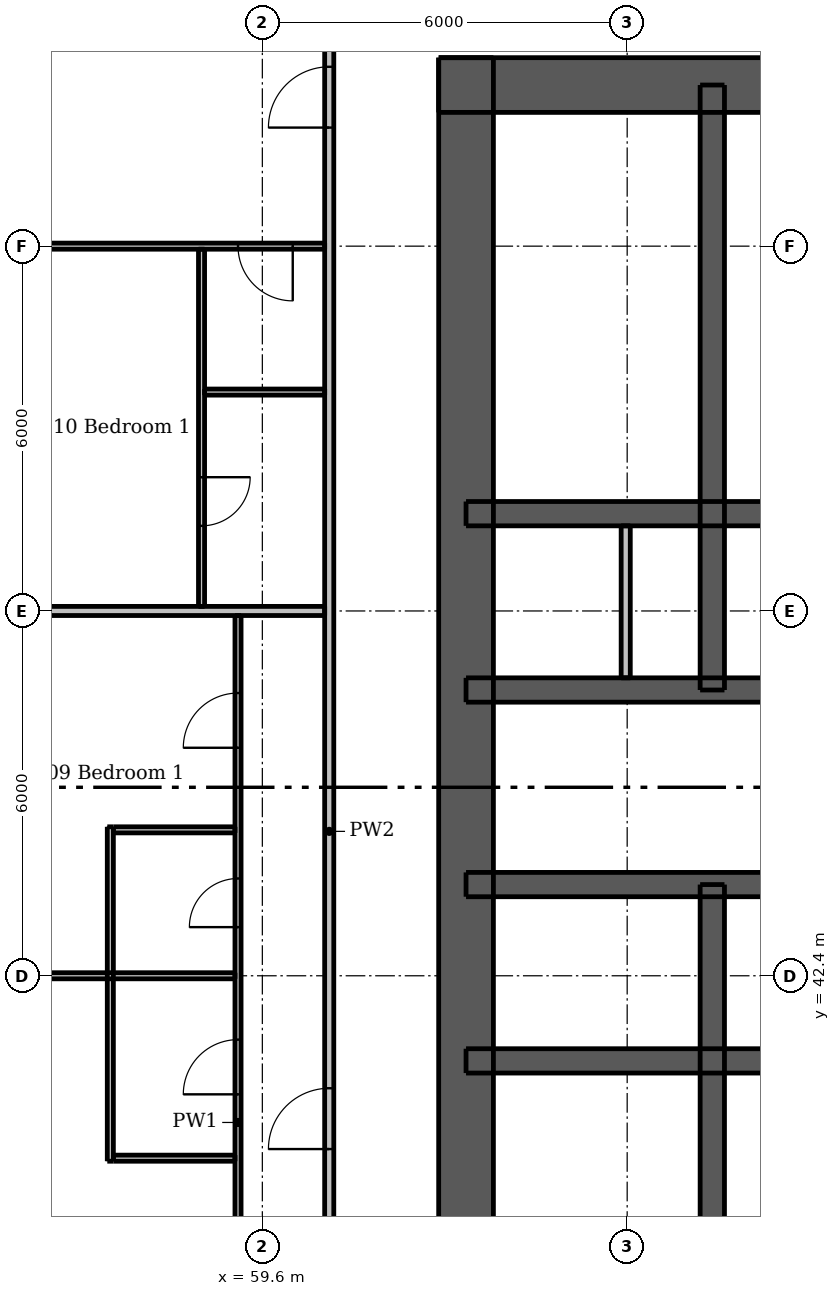
"""IFC4 building model, lengths in metres.
Left out: names, types, materials, properties, quantities, classifications, styles, units other than length and angle.
Written with IfcOpenShell. Run it as: python <this file> out.ifc"""

import sys

from ifc_helpers import new_model, si_unit, direction, frame, frame_2d, origin, place, context, subcontext, project, spatial, rectangle, extrude, element, fill, save


model = new_model("IFC4")
c1 = context("Model", 3, precision=1e-05, world=origin(), true_north=direction((0.0, 1.0)))
c2 = subcontext(c1, "Body", "Model", "MODEL_VIEW")
j1 = project(units=[si_unit("LENGTHUNIT", "METRE"), si_unit("PLANEANGLEUNIT", "RADIAN")], contexts=[c1])
p1 = place(None, origin())
s1 = spatial("IfcSite", under=j1, at=p1, CompositionType="ELEMENT")
p2 = place(p1, origin())
s2 = spatial("IfcBuilding", under=s1, at=p2, CompositionType="ELEMENT")
p3 = place(p2, frame((0.0, 0.0, 53.2)))
s3 = spatial("IfcBuildingStorey", under=s2, at=p3, CompositionType="ELEMENT", Elevation=53.2)
p4 = place(p3, frame((62.5, 57.05, 0.0), z_axis=(0.0, 0.0, 1.0), x_axis=(1.0, 0.0, 0.0)))
e1 = element("IfcWall", 1, at=p4, inside=s3, PredefinedType="SHEAR", context=c2, shape_type="SweptSolid", body=[
    extrude(rectangle(XDim=24.0, YDim=0.9, at=frame_2d((12.0, 0.0))), origin(), (0.0, 0.0, 1.0), 3.05),
])
p5 = place(p4, frame((20.85, 0.0, 0.0)))
e2 = element("IfcOpeningElement", 2, at=p5, cuts=e1, PredefinedType="OPENING", context=c2, shape_type="SweptSolid", body=[
    extrude(rectangle(XDim=1.1, YDim=2.1, at=frame_2d((0.55, 1.05))), frame((0.0, 0.46, 0.0), z_axis=(0.0, -1.0, 0.0), x_axis=(1.0, 0.0, 0.0)), (0.0, 0.0, 1.0), 0.92),
])
p6 = place(p4, frame((2.05, 0.0, 0.0)))
e3 = element("IfcOpeningElement", 3, at=p6, cuts=e1, PredefinedType="OPENING", context=c2, shape_type="SweptSolid", body=[
    extrude(rectangle(XDim=1.1, YDim=2.1, at=frame_2d((0.55, 1.05))), frame((0.0, 0.46, 0.0), z_axis=(0.0, -1.0, 0.0), x_axis=(1.0, 0.0, 0.0)), (0.0, 0.0, 1.0), 0.92),
])
p7 = place(p4, frame((11.55, 0.0, 0.0)))
e4 = element("IfcOpeningElement", 4, at=p7, cuts=e1, PredefinedType="OPENING", context=c2, shape_type="SweptSolid", body=[
    extrude(rectangle(XDim=0.9, YDim=2.1, at=frame_2d((0.45, 1.05))), frame((0.0, 0.46, 0.0), z_axis=(0.0, -1.0, 0.0), x_axis=(1.0, 0.0, 0.0)), (0.0, 0.0, 1.0), 0.92),
])
p8 = place(p3, frame((62.95, 33.5, 0.0), z_axis=(0.0, 0.0, 1.0), x_axis=(0.0, 1.0, 0.0)))
e5 = element("IfcWall", 5, at=p8, inside=s3, PredefinedType="SHEAR", context=c2, shape_type="SweptSolid", body=[
    extrude(rectangle(XDim=24.0, YDim=0.9, at=frame_2d((12.0, 0.0))), origin(), (0.0, 0.0, 1.0), 3.05),
])
p9 = place(p8, frame((11.2, 0.0, 0.0)))
e6 = element("IfcOpeningElement", 6, at=p9, cuts=e5, PredefinedType="OPENING", context=c2, shape_type="SweptSolid", body=[
    extrude(rectangle(XDim=1.6, YDim=2.1, at=frame_2d((0.8, 1.05))), frame((0.0, 0.46, 0.0), z_axis=(0.0, -1.0, 0.0), x_axis=(1.0, 0.0, 0.0)), (0.0, 0.0, 1.0), 0.92),
])
p10 = place(p3, frame((62.95, 41.0, 0.0), z_axis=(0.0, 0.0, 1.0), x_axis=(1.0, 0.0, 0.0)))
e7 = element("IfcWall", 7, at=p10, inside=s3, PredefinedType="SHEAR", context=c2, shape_type="SweptSolid", body=[
    extrude(rectangle(XDim=23.1, YDim=0.4, at=frame_2d((11.55, 0.0))), origin(), (0.0, 0.0, 1.0), 3.05),
])
p11 = place(p3, frame((62.95, 43.9, 0.0), z_axis=(0.0, 0.0, 1.0), x_axis=(1.0, 0.0, 0.0)))
e8 = element("IfcWall", 8, at=p11, inside=s3, PredefinedType="SHEAR", context=c2, shape_type="SweptSolid", body=[
    extrude(rectangle(XDim=23.1, YDim=0.4, at=frame_2d((11.55, 0.0))), origin(), (0.0, 0.0, 1.0), 3.05),
])
p12 = place(p11, frame((1.7, 0.0, 0.0)))
e9 = element("IfcOpeningElement", 9, at=p12, cuts=e8, PredefinedType="OPENING", context=c2, shape_type="SweptSolid", body=[
    extrude(rectangle(XDim=0.9, YDim=2.1, at=frame_2d((0.45, 1.05))), frame((0.0, 0.21, 0.0), z_axis=(0.0, -1.0, 0.0), x_axis=(1.0, 0.0, 0.0)), (0.0, 0.0, 1.0), 0.42),
])
p13 = place(p11, frame((20.5, 0.0, 0.0)))
e10 = element("IfcOpeningElement", 10, at=p13, cuts=e8, PredefinedType="OPENING", context=c2, shape_type="SweptSolid", body=[
    extrude(rectangle(XDim=0.9, YDim=2.1, at=frame_2d((0.45, 1.05))), frame((0.0, 0.21, 0.0), z_axis=(0.0, -1.0, 0.0), x_axis=(1.0, 0.0, 0.0)), (0.0, 0.0, 1.0), 0.42),
])
p14 = place(p11, frame((4.75, 0.0, 0.0)))
e11 = element("IfcOpeningElement", 11, at=p14, cuts=e8, PredefinedType="OPENING", context=c2, shape_type="SweptSolid", body=[
    extrude(rectangle(XDim=1.1, YDim=2.1, at=frame_2d((0.55, 1.05))), frame((0.0, 0.21, 0.0), z_axis=(0.0, -1.0, 0.0), x_axis=(1.0, 0.0, 0.0)), (0.0, 0.0, 1.0), 0.42),
])
p15 = place(p11, frame((7.25, 0.0, 0.0)))
e12 = element("IfcOpeningElement", 12, at=p15, cuts=e8, PredefinedType="OPENING", context=c2, shape_type="SweptSolid", body=[
    extrude(rectangle(XDim=1.1, YDim=2.1, at=frame_2d((0.55, 1.05))), frame((0.0, 0.21, 0.0), z_axis=(0.0, -1.0, 0.0), x_axis=(1.0, 0.0, 0.0)), (0.0, 0.0, 1.0), 0.42),
])
p16 = place(p11, frame((9.75, 0.0, 0.0)))
e13 = element("IfcOpeningElement", 13, at=p16, cuts=e8, PredefinedType="OPENING", context=c2, shape_type="SweptSolid", body=[
    extrude(rectangle(XDim=1.1, YDim=2.1, at=frame_2d((0.55, 1.05))), frame((0.0, 0.21, 0.0), z_axis=(0.0, -1.0, 0.0), x_axis=(1.0, 0.0, 0.0)), (0.0, 0.0, 1.0), 0.42),
])
p17 = place(p11, frame((12.25, 0.0, 0.0)))
e14 = element("IfcOpeningElement", 14, at=p17, cuts=e8, PredefinedType="OPENING", context=c2, shape_type="SweptSolid", body=[
    extrude(rectangle(XDim=1.1, YDim=2.1, at=frame_2d((0.55, 1.05))), frame((0.0, 0.21, 0.0), z_axis=(0.0, -1.0, 0.0), x_axis=(1.0, 0.0, 0.0)), (0.0, 0.0, 1.0), 0.42),
])
p18 = place(p11, frame((14.75, 0.0, 0.0)))
e15 = element("IfcOpeningElement", 15, at=p18, cuts=e8, PredefinedType="OPENING", context=c2, shape_type="SweptSolid", body=[
    extrude(rectangle(XDim=1.1, YDim=2.1, at=frame_2d((0.55, 1.05))), frame((0.0, 0.21, 0.0), z_axis=(0.0, -1.0, 0.0), x_axis=(1.0, 0.0, 0.0)), (0.0, 0.0, 1.0), 0.42),
])
p19 = place(p11, frame((17.25, 0.0, 0.0)))
e16 = element("IfcOpeningElement", 16, at=p19, cuts=e8, PredefinedType="OPENING", context=c2, shape_type="SweptSolid", body=[
    extrude(rectangle(XDim=1.1, YDim=2.1, at=frame_2d((0.55, 1.05))), frame((0.0, 0.21, 0.0), z_axis=(0.0, -1.0, 0.0), x_axis=(1.0, 0.0, 0.0)), (0.0, 0.0, 1.0), 0.42),
])
p20 = place(p3, frame((62.95, 47.1, 0.0), z_axis=(0.0, 0.0, 1.0), x_axis=(1.0, 0.0, 0.0)))
e17 = element("IfcWall", 17, at=p20, inside=s3, PredefinedType="SHEAR", context=c2, shape_type="SweptSolid", body=[
    extrude(rectangle(XDim=23.1, YDim=0.4, at=frame_2d((11.55, 0.0))), origin(), (0.0, 0.0, 1.0), 3.05),
])
p21 = place(p20, frame((1.088, 0.0, 0.0)))
e18 = element("IfcOpeningElement", 18, at=p21, cuts=e17, PredefinedType="OPENING", context=c2, shape_type="SweptSolid", body=[
    extrude(rectangle(XDim=0.9, YDim=2.1, at=frame_2d((0.45, 1.05))), frame((0.0, 0.21, 0.0), z_axis=(0.0, -1.0, 0.0), x_axis=(1.0, 0.0, 0.0)), (0.0, 0.0, 1.0), 0.42),
])
p22 = place(p20, frame((2.838, 0.0, 0.0)))
e19 = element("IfcOpeningElement", 19, at=p22, cuts=e17, PredefinedType="OPENING", context=c2, shape_type="SweptSolid", body=[
    extrude(rectangle(XDim=0.8, YDim=2.1, at=frame_2d((0.4, 1.05))), frame((0.0, 0.21, 0.0), z_axis=(0.0, -1.0, 0.0), x_axis=(1.0, 0.0, 0.0)), (0.0, 0.0, 1.0), 0.42),
])
p23 = place(p20, frame((20.5, 0.0, 0.0)))
e20 = element("IfcOpeningElement", 20, at=p23, cuts=e17, PredefinedType="OPENING", context=c2, shape_type="SweptSolid", body=[
    extrude(rectangle(XDim=0.9, YDim=2.1, at=frame_2d((0.45, 1.05))), frame((0.0, 0.21, 0.0), z_axis=(0.0, -1.0, 0.0), x_axis=(1.0, 0.0, 0.0)), (0.0, 0.0, 1.0), 0.42),
])
p24 = place(p3, frame((62.95, 50.0, 0.0), z_axis=(0.0, 0.0, 1.0), x_axis=(1.0, 0.0, 0.0)))
e21 = element("IfcWall", 21, at=p24, inside=s3, PredefinedType="SHEAR", context=c2, shape_type="SweptSolid", body=[
    extrude(rectangle(XDim=23.1, YDim=0.4, at=frame_2d((11.55, 0.0))), origin(), (0.0, 0.0, 1.0), 3.05),
])
p25 = place(p3, frame((67.0, 33.95, 0.0), z_axis=(0.0, 0.0, 1.0), x_axis=(0.0, 1.0, 0.0)))
e22 = element("IfcWall", 22, at=p25, inside=s3, PredefinedType="SHEAR", context=c2, shape_type="SweptSolid", body=[
    extrude(rectangle(XDim=9.95, YDim=0.4, at=frame_2d((4.975, 0.0))), origin(), (0.0, 0.0, 1.0), 3.05),
])
p26 = place(p25, frame((0.65, 0.0, 0.0)))
e23 = element("IfcOpeningElement", 23, at=p26, cuts=e22, PredefinedType="OPENING", context=c2, shape_type="SweptSolid", body=[
    extrude(rectangle(XDim=1.1, YDim=2.1, at=frame_2d((0.55, 1.05))), frame((0.0, 0.21, 0.0), z_axis=(0.0, -1.0, 0.0), x_axis=(1.0, 0.0, 0.0)), (0.0, 0.0, 1.0), 0.42),
])
p27 = place(p3, frame((67.0, 47.1, 0.0), z_axis=(0.0, 0.0, 1.0), x_axis=(0.0, 1.0, 0.0)))
e24 = element("IfcWall", 24, at=p27, inside=s3, PredefinedType="SHEAR", context=c2, shape_type="SweptSolid", body=[
    extrude(rectangle(XDim=9.95, YDim=0.4, at=frame_2d((4.975, 0.0))), origin(), (0.0, 0.0, 1.0), 3.05),
])
p28 = place(p3, frame((65.576, 47.3, 0.0), z_axis=(0.0, 0.0, 1.0), x_axis=(0.0, 1.0, 0.0)))
e25 = element("IfcWall", 25, at=p28, inside=s3, PredefinedType="PLUMBINGWALL", context=c2, shape_type="SweptSolid", body=[
    extrude(rectangle(XDim=2.5, YDim=0.15, at=frame_2d((1.25, 0.0))), origin(), (0.0, 0.0, 1.0), 3.05),
])
p29 = place(p3, frame((57.1, 39.35, 0.0), z_axis=(0.0, 0.0, 1.0), x_axis=(0.0, 1.0, 0.0)))
e26 = element("IfcWall", 26, at=p29, inside=s3, PredefinedType="PARTITIONING", context=c2, shape_type="SweptSolid", body=[
    extrude(rectangle(XDim=5.5, YDim=0.1, at=frame_2d((2.75, 0.0))), origin(), (0.0, 0.0, 1.0), 3.05),
])
p30 = place(p3, frame((58.6, 54.35, 0.0), z_axis=(0.0, 0.0, 1.0), x_axis=(0.0, -1.0, 0.0)))
e27 = element("IfcWall", 27, at=p30, inside=s3, PredefinedType="PARTITIONING", context=c2, shape_type="SweptSolid", body=[
    extrude(rectangle(XDim=5.875, YDim=0.1, at=frame_2d((2.938, 0.0))), origin(), (0.0, 0.0, 1.0), 3.05),
])
p31 = place(p30, frame((3.75, 0.0, 0.0)))
e28 = element("IfcOpeningElement", 28, at=p31, cuts=e27, PredefinedType="OPENING", context=c2, shape_type="SweptSolid", body=[
    extrude(rectangle(XDim=0.8, YDim=2.1, at=frame_2d((0.4, 1.05))), frame((0.0, 0.06, 0.0), z_axis=(0.0, -1.0, 0.0), x_axis=(1.0, 0.0, 0.0)), (0.0, 0.0, 1.0), 0.12),
])
p32 = place(p3, frame((59.2, 31.65, 0.0), z_axis=(0.0, 0.0, 1.0), x_axis=(0.0, 1.0, 0.0)))
e29 = element("IfcWall", 29, at=p32, inside=s3, PredefinedType="PARTITIONING", context=c2, shape_type="SweptSolid", body=[
    extrude(rectangle(XDim=16.675, YDim=0.1, at=frame_2d((8.337, 0.0))), origin(), (0.0, 0.0, 1.0), 3.05),
])
p33 = place(p32, frame((3.45, 0.0, 0.0)))
e30 = element("IfcOpeningElement", 30, at=p33, cuts=e29, PredefinedType="OPENING", context=c2, shape_type="SweptSolid", body=[
    extrude(rectangle(XDim=0.9, YDim=2.1, at=frame_2d((0.45, 1.05))), frame((0.0, 0.06, 0.0), z_axis=(0.0, -1.0, 0.0), x_axis=(1.0, 0.0, 0.0)), (0.0, 0.0, 1.0), 0.12),
])
p34 = place(p32, frame((8.8, 0.0, 0.0)))
e31 = element("IfcOpeningElement", 31, at=p34, cuts=e29, PredefinedType="OPENING", context=c2, shape_type="SweptSolid", body=[
    extrude(rectangle(XDim=0.9, YDim=2.1, at=frame_2d((0.45, 1.05))), frame((0.0, 0.06, 0.0), z_axis=(0.0, -1.0, 0.0), x_axis=(1.0, 0.0, 0.0)), (0.0, 0.0, 1.0), 0.12),
])
p35 = place(p32, frame((14.5, 0.0, 0.0)))
e32 = element("IfcOpeningElement", 32, at=p35, cuts=e29, PredefinedType="OPENING", context=c2, shape_type="SweptSolid", body=[
    extrude(rectangle(XDim=0.9, YDim=2.1, at=frame_2d((0.45, 1.05))), frame((0.0, 0.06, 0.0), z_axis=(0.0, -1.0, 0.0), x_axis=(1.0, 0.0, 0.0)), (0.0, 0.0, 1.0), 0.12),
])
p36 = place(p32, frame((11.55, 0.0, 0.0)))
e33 = element("IfcOpeningElement", 33, at=p36, cuts=e29, PredefinedType="OPENING", context=c2, shape_type="SweptSolid", body=[
    extrude(rectangle(XDim=0.8, YDim=2.1, at=frame_2d((0.4, 1.05))), frame((0.0, 0.06, 0.0), z_axis=(0.0, -1.0, 0.0), x_axis=(1.0, 0.0, 0.0)), (0.0, 0.0, 1.0), 0.12),
])
p37 = place(p3, frame((60.625, 54.4, 0.0), z_axis=(0.0, 0.0, 1.0), x_axis=(-1.0, 0.0, 0.0)))
e34 = element("IfcWall", 34, at=p37, inside=s3, PredefinedType="PARTITIONING", context=c2, shape_type="SweptSolid", body=[
    extrude(rectangle(XDim=8.625, YDim=0.1, at=frame_2d((4.312, 0.0))), origin(), (0.0, 0.0, 1.0), 2.516),
])
p38 = place(p37, frame((0.525, 0.0, 0.0)))
e35 = element("IfcOpeningElement", 35, at=p38, cuts=e34, PredefinedType="OPENING", context=c2, shape_type="SweptSolid", body=[
    extrude(rectangle(XDim=0.9, YDim=2.1, at=frame_2d((0.45, 1.05))), frame((0.0, 0.06, 0.0), z_axis=(0.0, -1.0, 0.0), x_axis=(1.0, 0.0, 0.0)), (0.0, 0.0, 1.0), 0.12),
])
p39 = place(p37, frame((4.875, 0.0, 0.0)))
e36 = element("IfcOpeningElement", 36, at=p39, cuts=e34, PredefinedType="OPENING", context=c2, shape_type="SweptSolid", body=[
    extrude(rectangle(XDim=0.9, YDim=2.1, at=frame_2d((0.45, 1.05))), frame((0.0, 0.06, 0.0), z_axis=(0.0, -1.0, 0.0), x_axis=(1.0, 0.0, 0.0)), (0.0, 0.0, 1.0), 0.12),
])
p40 = place(p3, frame((58.65, 52.0, 0.0), z_axis=(0.0, 0.0, 1.0), x_axis=(1.0, 0.0, 0.0)))
e37 = element("IfcWall", 37, at=p40, inside=s3, PredefinedType="PARTITIONING", context=c2, shape_type="SweptSolid", body=[
    extrude(rectangle(XDim=1.975, YDim=0.1, at=frame_2d((0.988, 0.0))), origin(), (0.0, 0.0, 1.0), 3.05),
])
p41 = place(p3, frame((57.15, 44.8, 0.0), z_axis=(0.0, 0.0, 1.0), x_axis=(1.0, 0.0, 0.0)))
e38 = element("IfcWall", 38, at=p41, inside=s3, PredefinedType="PARTITIONING", context=c2, shape_type="SweptSolid", body=[
    extrude(rectangle(XDim=2.0, YDim=0.1, at=frame_2d((1.0, 0.0))), origin(), (0.0, 0.0, 1.0), 3.05),
])
p42 = place(p3, frame((52.0, 42.4, 0.0), z_axis=(0.0, 0.0, 1.0), x_axis=(1.0, 0.0, 0.0)))
e39 = element("IfcWall", 39, at=p42, inside=s3, PredefinedType="PARTITIONING", context=c2, shape_type="SweptSolid", body=[
    extrude(rectangle(XDim=7.15, YDim=0.1, at=frame_2d((3.575, 0.0))), origin(), (0.0, 0.0, 1.0), 2.516),
])
p43 = place(p3, frame((57.15, 39.4, 0.0), z_axis=(0.0, 0.0, 1.0), x_axis=(1.0, 0.0, 0.0)))
e40 = element("IfcWall", 40, at=p43, inside=s3, PredefinedType="PARTITIONING", context=c2, shape_type="SweptSolid", body=[
    extrude(rectangle(XDim=2.0, YDim=0.1, at=frame_2d((1.0, 0.0))), origin(), (0.0, 0.0, 1.0), 3.05),
])
p44 = place(p3, frame((60.7, 30.325, 0.0), z_axis=(0.0, 0.0, 1.0), x_axis=(0.0, 1.0, 0.0)))
e41 = element("IfcWall", 41, at=p44, inside=s3, PredefinedType="PARTITIONING", context=c2, shape_type="SweptSolid", body=[
    extrude(rectangle(XDim=28.9, YDim=0.15, at=frame_2d((14.45, 0.0))), origin(), (0.0, 0.0, 1.0), 3.05),
])
p45 = place(p44, frame((9.225, 0.0, 0.0)))
e42 = element("IfcOpeningElement", 42, at=p45, cuts=e41, PredefinedType="OPENING", context=c2, shape_type="SweptSolid", body=[
    extrude(rectangle(XDim=1.0, YDim=2.1, at=frame_2d((0.5, 1.05))), frame((0.0, 0.085, 0.0), z_axis=(0.0, -1.0, 0.0), x_axis=(1.0, 0.0, 0.0)), (0.0, 0.0, 1.0), 0.17),
])
p46 = place(p44, frame((26.025, 0.0, 0.0)))
e43 = element("IfcOpeningElement", 43, at=p46, cuts=e41, PredefinedType="OPENING", context=c2, shape_type="SweptSolid", body=[
    extrude(rectangle(XDim=1.0, YDim=2.1, at=frame_2d((0.5, 1.05))), frame((0.0, 0.085, 0.0), z_axis=(0.0, -1.0, 0.0), x_axis=(1.0, 0.0, 0.0)), (0.0, 0.0, 1.0), 0.17),
])
p47 = place(p3, frame((52.0, 48.4, 0.0), z_axis=(0.0, 0.0, 1.0), x_axis=(1.0, 0.0, 0.0)))
e44 = element("IfcWall", 44, at=p47, inside=s3, PredefinedType="PARTITIONING", context=c2, shape_type="SweptSolid", body=[
    extrude(rectangle(XDim=8.625, YDim=0.15, at=frame_2d((4.312, 0.0))), origin(), (0.0, 0.0, 1.0), 2.516),
])
p48 = place(p6, origin())
e45 = element("IfcDoor", 45, at=p48, inside=s3, OperationType="SINGLE_SWING_LEFT", PredefinedType="DOOR", context=c2, shape_type="SweptSolid", body=[
    extrude(rectangle(XDim=1.1, YDim=2.1, at=frame_2d((0.55, 1.05))), frame((0.0, -0.388, 0.0), z_axis=(0.0, -1.0, 0.0), x_axis=(1.0, 0.0, 0.0)), (0.0, 0.0, 1.0), 0.05),
])
fill(e3, e45)
p49 = place(p9, origin())
e46 = element("IfcDoor", 46, at=p49, inside=s3, OperationType="DOUBLE_DOOR_SINGLE_SWING", PredefinedType="DOOR", context=c2, shape_type="SweptSolid", body=[
    extrude(rectangle(XDim=1.6, YDim=2.1, at=frame_2d((0.8, 1.05))), frame((0.0, -0.388, 0.0), z_axis=(0.0, -1.0, 0.0), x_axis=(1.0, 0.0, 0.0)), (0.0, 0.0, 1.0), 0.05),
])
fill(e6, e46)
p50 = place(p12, origin())
e47 = element("IfcDoor", 47, at=p50, inside=s3, OperationType="SINGLE_SWING_LEFT", PredefinedType="DOOR", context=c2, shape_type="SweptSolid", body=[
    extrude(rectangle(XDim=0.9, YDim=2.1, at=frame_2d((0.45, 1.05))), frame((0.0, -0.138, 0.0), z_axis=(0.0, -1.0, 0.0), x_axis=(1.0, 0.0, 0.0)), (0.0, 0.0, 1.0), 0.05),
])
fill(e9, e47)
p51 = place(p21, origin())
e48 = element("IfcDoor", 48, at=p51, inside=s3, OperationType="SINGLE_SWING_LEFT", PredefinedType="DOOR", context=c2, shape_type="SweptSolid", body=[
    extrude(rectangle(XDim=0.9, YDim=2.1, at=frame_2d((0.45, 1.05))), frame((0.0, 0.188, 0.0), z_axis=(0.0, -1.0, 0.0), x_axis=(1.0, 0.0, 0.0)), (0.0, 0.0, 1.0), 0.05),
])
fill(e18, e48)
p52 = place(p22, origin())
e49 = element("IfcDoor", 49, at=p52, inside=s3, OperationType="SINGLE_SWING_RIGHT", PredefinedType="DOOR", context=c2, shape_type="SweptSolid", body=[
    extrude(rectangle(XDim=0.8, YDim=2.1, at=frame_2d((0.4, 1.05))), frame((0.0, 0.188, 0.0), z_axis=(0.0, -1.0, 0.0), x_axis=(1.0, 0.0, 0.0)), (0.0, 0.0, 1.0), 0.05),
])
fill(e19, e49)
p53 = place(p14, origin())
e50 = element("IfcDoor", 50, at=p53, inside=s3, OperationType="DOUBLE_DOOR_SLIDING", PredefinedType="DOOR", context=c2, shape_type="SweptSolid", body=[
    extrude(rectangle(XDim=1.1, YDim=2.1, at=frame_2d((0.55, 1.05))), frame((0.0, 0.025, 0.0), z_axis=(0.0, -1.0, 0.0), x_axis=(1.0, 0.0, 0.0)), (0.0, 0.0, 1.0), 0.05),
])
fill(e11, e50)
p54 = place(p45, origin())
e51 = element("IfcDoor", 51, at=p54, inside=s3, OperationType="SINGLE_SWING_LEFT", PredefinedType="DOOR", context=c2, shape_type="SweptSolid", body=[
    extrude(rectangle(XDim=1.0, YDim=2.1, at=frame_2d((0.5, 1.05))), frame((0.0, 0.025, 0.0), z_axis=(0.0, -1.0, 0.0), x_axis=(1.0, 0.0, 0.0)), (0.0, 0.0, 1.0), 0.05),
])
fill(e42, e51)
p55 = place(p34, origin())
e52 = element("IfcDoor", 52, at=p55, inside=s3, OperationType="SINGLE_SWING_LEFT", PredefinedType="DOOR", context=c2, shape_type="SweptSolid", body=[
    extrude(rectangle(XDim=0.9, YDim=2.1, at=frame_2d((0.45, 1.05))), frame((0.0, 0.025, 0.0), z_axis=(0.0, -1.0, 0.0), x_axis=(1.0, 0.0, 0.0)), (0.0, 0.0, 1.0), 0.05),
])
fill(e31, e52)
p56 = place(p35, origin())
e53 = element("IfcDoor", 53, at=p56, inside=s3, OperationType="SINGLE_SWING_LEFT", PredefinedType="DOOR", context=c2, shape_type="SweptSolid", body=[
    extrude(rectangle(XDim=0.9, YDim=2.1, at=frame_2d((0.45, 1.05))), frame((0.0, 0.025, 0.0), z_axis=(0.0, -1.0, 0.0), x_axis=(1.0, 0.0, 0.0)), (0.0, 0.0, 1.0), 0.05),
])
fill(e32, e53)
p57 = place(p36, origin())
e54 = element("IfcDoor", 54, at=p57, inside=s3, OperationType="SINGLE_SWING_LEFT", PredefinedType="DOOR", context=c2, shape_type="SweptSolid", body=[
    extrude(rectangle(XDim=0.8, YDim=2.1, at=frame_2d((0.4, 1.05))), frame((0.0, 0.025, 0.0), z_axis=(0.0, -1.0, 0.0), x_axis=(1.0, 0.0, 0.0)), (0.0, 0.0, 1.0), 0.05),
])
fill(e33, e54)
p58 = place(p46, origin())
e55 = element("IfcDoor", 55, at=p58, inside=s3, OperationType="SINGLE_SWING_LEFT", PredefinedType="DOOR", context=c2, shape_type="SweptSolid", body=[
    extrude(rectangle(XDim=1.0, YDim=2.1, at=frame_2d((0.5, 1.05))), frame((0.0, 0.025, 0.0), z_axis=(0.0, -1.0, 0.0), x_axis=(1.0, 0.0, 0.0)), (0.0, 0.0, 1.0), 0.05),
])
fill(e43, e55)
p59 = place(p38, origin())
e56 = element("IfcDoor", 56, at=p59, inside=s3, OperationType="SINGLE_SWING_LEFT", PredefinedType="DOOR", context=c2, shape_type="SweptSolid", body=[
    extrude(rectangle(XDim=0.9, YDim=2.1, at=frame_2d((0.45, 1.05))), frame((0.0, 0.025, 0.0), z_axis=(0.0, -1.0, 0.0), x_axis=(1.0, 0.0, 0.0)), (0.0, 0.0, 1.0), 0.05),
])
fill(e35, e56)
p60 = place(p31, origin())
e57 = element("IfcDoor", 57, at=p60, inside=s3, OperationType="SINGLE_SWING_LEFT", PredefinedType="DOOR", context=c2, shape_type="SweptSolid", body=[
    extrude(rectangle(XDim=0.8, YDim=2.1, at=frame_2d((0.4, 1.05))), frame((0.0, 0.025, 0.0), z_axis=(0.0, -1.0, 0.0), x_axis=(1.0, 0.0, 0.0)), (0.0, 0.0, 1.0), 0.05),
])
fill(e28, e57)
save(model, sys.argv[1])
